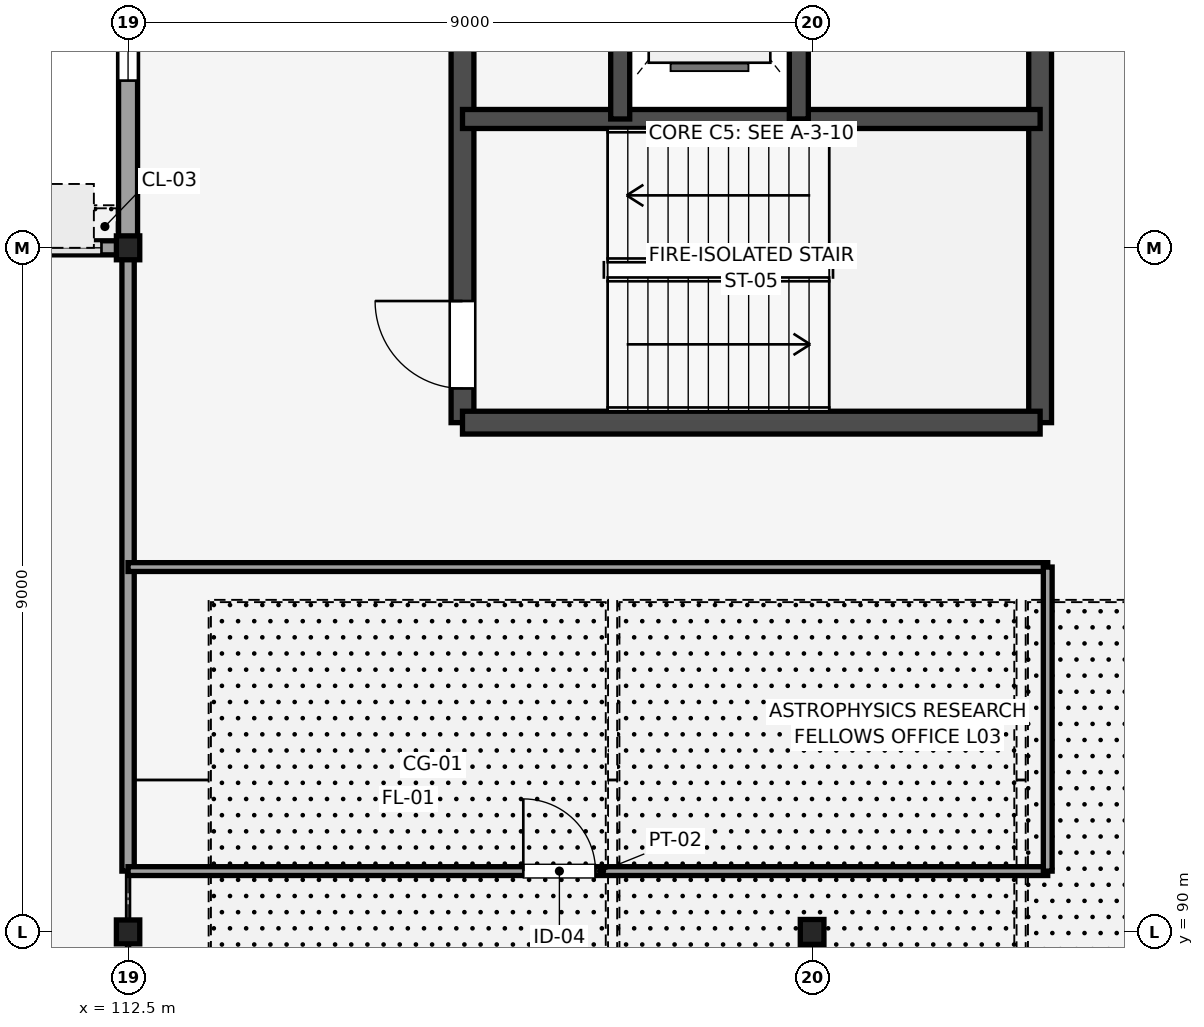
"""IFC4 building model, lengths in metres.
Left out: names, types, materials, properties, quantities, classifications, styles, units other than length and angle.
Written with IfcOpenShell. Run it as: python <this file> out.ifc"""

import sys

from ifc_helpers import new_model, si_unit, direction, frame, frame_2d, origin, origin_2d, place, context, subcontext, project, spatial, rectangle, i_section, extrude, element, fill, save


model = new_model("IFC4")
c1 = context("Model", 3, precision=1e-05, world=origin(), true_north=direction((0.0, 1.0)))
c2 = subcontext(c1, "Body", "Model", "MODEL_VIEW")
j1 = project(units=[si_unit("LENGTHUNIT", "METRE"), si_unit("PLANEANGLEUNIT", "RADIAN")], contexts=[c1])
p1 = place(None, origin())
s1 = spatial("IfcSite", under=j1, at=p1, CompositionType="ELEMENT")
p2 = place(p1, origin())
s2 = spatial("IfcBuilding", under=s1, at=p2, CompositionType="ELEMENT")
p3 = place(p2, frame((0.0, 0.0, 14.4)))
s3 = spatial("IfcBuildingStorey", under=s2, at=p3, CompositionType="ELEMENT", Elevation=14.4)
for number, where, z_axis, x_axis in (
    (1, (112.5, 90.0, 0.0), (0.0, 0.0, 1.0), (1.0, 0.0, 0.0)),
    (2, (112.5, 99.0, 0.0), (0.0, 0.0, 1.0), (1.0, 0.0, 0.0)),
):
    element("IfcColumn", number, at=place(p3, frame(where, z_axis=z_axis, x_axis=x_axis)), inside=s3, PredefinedType="COLUMN", context=c2, shape_type="SweptSolid", body=[
        extrude(i_section(OverallWidth=0.307, OverallDepth=0.315, WebThickness=0.012, FlangeThickness=0.019, FilletRadius=0.017, at=origin_2d()), origin(), (0.0, 0.0, 1.0), 4.5),
    ])
p4 = place(p3, frame((121.5, 90.0, 0.0), z_axis=(0.0, 0.0, 1.0), x_axis=(1.0, 0.0, 0.0)))
e3 = element("IfcColumn", 3, at=p4, inside=s3, PredefinedType="COLUMN", context=c2, shape_type="SweptSolid", body=[
    extrude(i_section(OverallWidth=0.311, OverallDepth=0.327, WebThickness=0.016, FlangeThickness=0.025, FilletRadius=0.017, at=origin_2d()), origin(), (0.0, 0.0, 1.0), 4.5),
])
p5 = place(p3, frame((116.9, 96.7, 0.0), z_axis=(0.0, 0.0, 1.0), x_axis=(0.0, 1.0, 0.0)))
e4 = element("IfcWall", 4, at=p5, inside=s3, PredefinedType="SHEAR", context=c2, shape_type="SweptSolid", body=[
    extrude(rectangle(XDim=7.6, YDim=0.3, at=frame_2d((3.8, 0.0))), origin(), (0.0, 0.0, 1.0), 4.5),
])
p6 = place(p5, frame((0.45, 0.0, 0.0)))
e5 = element("IfcOpeningElement", 5, at=p6, cuts=e4, PredefinedType="OPENING", context=c2, shape_type="SweptSolid", body=[
    extrude(rectangle(XDim=1.15, YDim=2.15, at=frame_2d((0.575, 1.075))), frame((0.0, 0.16, 0.0), z_axis=(0.0, -1.0, 0.0), x_axis=(1.0, 0.0, 0.0)), (0.0, 0.0, 1.0), 0.32),
])
for number, where, z_axis, x_axis in (
    (6, (124.5, 96.7, 0.0), (0.0, 0.0, 1.0), (0.0, 1.0, 0.0)),
    (7, (116.9, 96.7, 0.0), (0.0, 0.0, 1.0), (1.0, 0.0, 0.0)),
):
    element("IfcWall", number, at=place(p3, frame(where, z_axis=z_axis, x_axis=x_axis)), inside=s3, PredefinedType="SHEAR", context=c2, shape_type="SweptSolid", body=[
        extrude(rectangle(XDim=7.6, YDim=0.3, at=frame_2d((3.8, 0.0))), origin(), (0.0, 0.0, 1.0), 4.5),
    ])
p7 = place(p3, frame((116.9, 100.695, 0.0), z_axis=(0.0, 0.0, 1.0), x_axis=(1.0, 0.0, 0.0)))
e8 = element("IfcWall", 8, at=p7, inside=s3, PredefinedType="SHEAR", context=c2, shape_type="SweptSolid", body=[
    extrude(rectangle(XDim=7.6, YDim=0.25, at=frame_2d((3.8, 0.0))), origin(), (0.0, 0.0, 1.0), 4.5),
])
for number, where, z_axis, x_axis in (
    (9, (118.975, 100.695, 0.0), (0.0, 0.0, 1.0), (0.0, 1.0, 0.0)),
    (10, (121.325, 100.695, 0.0), (0.0, 0.0, 1.0), (0.0, 1.0, 0.0)),
):
    element("IfcWall", number, at=place(p3, frame(where, z_axis=z_axis, x_axis=x_axis)), inside=s3, PredefinedType="SHEAR", context=c2, shape_type="SweptSolid", body=[
        extrude(rectangle(XDim=3.605, YDim=0.25, at=frame_2d((1.802, 0.0))), origin(), (0.0, 0.0, 1.0), 4.5),
    ])
p8 = place(p3, frame((112.5, 111.6, 0.0), z_axis=(0.0, 0.0, 1.0), x_axis=(0.0, -1.0, 0.0)))
e11 = element("IfcWall", 11, at=p8, inside=s3, PredefinedType="STANDARD", context=c2, shape_type="SweptSolid", body=[
    extrude(rectangle(XDim=12.6, YDim=0.25, at=frame_2d((6.3, 0.0))), origin(), (0.0, 0.0, 1.0), 3.816),
])
p9 = place(p8, frame((0.65, 0.0, 1.0)))
e12 = element("IfcOpeningElement", 12, at=p9, cuts=e11, PredefinedType="OPENING", context=c2, shape_type="SweptSolid", body=[
    extrude(rectangle(XDim=1.5, YDim=1.5, at=frame_2d((0.75, 0.75))), frame((0.0, 0.135, 0.0), z_axis=(0.0, -1.0, 0.0), x_axis=(1.0, 0.0, 0.0)), (0.0, 0.0, 1.0), 0.27),
])
p10 = place(p8, frame((8.9, 0.0, 1.0)))
e13 = element("IfcOpeningElement", 13, at=p10, cuts=e11, PredefinedType="OPENING", context=c2, shape_type="SweptSolid", body=[
    extrude(rectangle(XDim=1.5, YDim=1.5, at=frame_2d((0.75, 0.75))), frame((0.0, 0.135, 0.0), z_axis=(0.0, -1.0, 0.0), x_axis=(1.0, 0.0, 0.0)), (0.0, 0.0, 1.0), 0.27),
])
p11 = place(p8, frame((4.6, 0.0, 1.0)))
e14 = element("IfcOpeningElement", 14, at=p11, cuts=e11, PredefinedType="OPENING", context=c2, shape_type="SweptSolid", body=[
    extrude(rectangle(XDim=1.75, YDim=1.55, at=frame_2d((0.875, 0.775))), frame((0.0, 0.135, 0.0), z_axis=(0.0, -1.0, 0.0), x_axis=(1.0, 0.0, 0.0)), (0.0, 0.0, 1.0), 0.27),
])
p12 = place(p3, frame((69.0, 99.0, 4.5), z_axis=(0.0, 0.0, 1.0), x_axis=(1.0, 0.0, 0.0)))
e15 = element("IfcWall", 15, at=p12, inside=s3, PredefinedType="PARAPET", context=c2, shape_type="SweptSolid", body=[
    extrude(rectangle(XDim=43.5, YDim=0.185, at=frame_2d((21.75, 0.0))), origin(), (0.0, 0.0, 1.0), 1.0),
])
p13 = place(p3, frame((112.5, 90.8, 0.0), z_axis=(0.0, 0.0, 1.0), x_axis=(0.0, 1.0, 0.0)))
e16 = element("IfcWall", 16, at=p13, inside=s3, PredefinedType="PARTITIONING", context=c2, shape_type="SweptSolid", body=[
    extrude(rectangle(XDim=8.2, YDim=0.162, at=frame_2d((4.1, 0.0))), origin(), (0.0, 0.0, 1.0), 3.846),
])
p14 = place(p3, frame((112.5, 90.8, 0.0), z_axis=(0.0, 0.0, 1.0), x_axis=(1.0, 0.0, 0.0)))
e17 = element("IfcWall", 17, at=p14, inside=s3, PredefinedType="PARTITIONING", context=c2, shape_type="SweptSolid", body=[
    extrude(rectangle(XDim=12.1, YDim=0.116, at=frame_2d((6.05, 0.0))), origin(), (0.0, 0.0, 1.0), 4.32),
])
p15 = place(p14, frame((5.2, 0.0, 0.0)))
e18 = element("IfcOpeningElement", 18, at=p15, cuts=e17, PredefinedType="OPENING", context=c2, shape_type="SweptSolid", body=[
    extrude(rectangle(XDim=0.95, YDim=2.15, at=frame_2d((0.475, 1.075))), frame((0.0, 0.068, 0.0), z_axis=(0.0, -1.0, 0.0), x_axis=(1.0, 0.0, 0.0)), (0.0, 0.0, 1.0), 0.136),
])
p16 = place(p3, frame((112.5, 94.8, 0.0), z_axis=(0.0, 0.0, 1.0), x_axis=(1.0, 0.0, 0.0)))
e19 = element("IfcWall", 19, at=p16, inside=s3, PredefinedType="PARTITIONING", context=c2, shape_type="SweptSolid", body=[
    extrude(rectangle(XDim=12.1, YDim=0.116, at=frame_2d((6.05, 0.0))), origin(), (0.0, 0.0, 1.0), 4.32),
])
p17 = place(p3, frame((124.6, 90.8, 0.0), z_axis=(0.0, 0.0, 1.0), x_axis=(0.0, 1.0, 0.0)))
e20 = element("IfcWall", 20, at=p17, inside=s3, PredefinedType="PARTITIONING", context=c2, shape_type="SweptSolid", body=[
    extrude(rectangle(XDim=4.0, YDim=0.116, at=frame_2d((2.0, 0.0))), origin(), (0.0, 0.0, 1.0), 4.32),
])
p18 = place(p10, origin())
e21 = element("IfcWindow", 21, at=p18, inside=s3, PartitioningType="SINGLE_PANEL", PredefinedType="WINDOW", context=c2, shape_type="SweptSolid", body=[
    extrude(rectangle(XDim=1.5, YDim=1.5, at=frame_2d((0.75, 0.75))), frame((0.0, 0.03, 0.0), z_axis=(0.0, -1.0, 0.0), x_axis=(1.0, 0.0, 0.0)), (0.0, 0.0, 1.0), 0.06),
])
fill(e13, e21)
p19 = place(p6, origin())
e22 = element("IfcDoor", 22, at=p19, inside=s3, OperationType="SINGLE_SWING_RIGHT", PredefinedType="DOOR", context=c2, shape_type="SweptSolid", body=[
    extrude(rectangle(XDim=1.15, YDim=2.15, at=frame_2d((0.575, 1.075))), frame((0.0, 0.025, 0.0), z_axis=(0.0, -1.0, 0.0), x_axis=(1.0, 0.0, 0.0)), (0.0, 0.0, 1.0), 0.05),
])
fill(e5, e22)
p20 = place(p15, origin())
e23 = element("IfcDoor", 23, at=p20, inside=s3, OperationType="SINGLE_SWING_LEFT", PredefinedType="DOOR", context=c2, shape_type="SweptSolid", body=[
    extrude(rectangle(XDim=0.95, YDim=2.15, at=frame_2d((0.475, 1.075))), frame((0.0, 0.025, 0.0), z_axis=(0.0, -1.0, 0.0), x_axis=(1.0, 0.0, 0.0)), (0.0, 0.0, 1.0), 0.05),
])
fill(e18, e23)
save(model, sys.argv[1])
